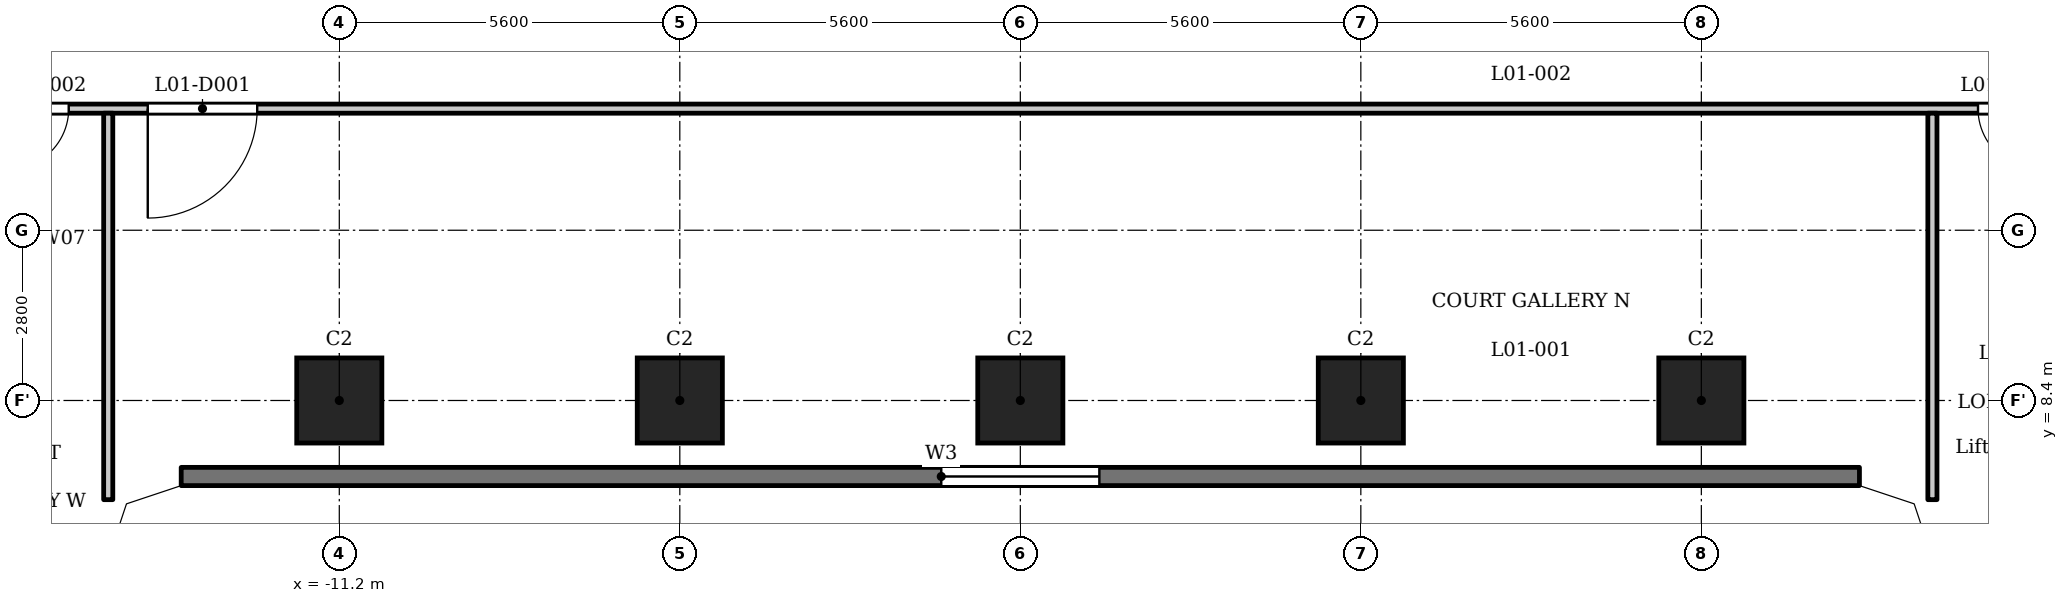
"""IFC4 building model, lengths in metres.
Left out: names, types, materials, properties, quantities, classifications, styles, units other than length and angle.
Written with IfcOpenShell. Run it as: python <this file> out.ifc"""

import sys

from ifc_helpers import new_model, si_unit, direction, frame, frame_2d, origin, origin_2d, place, context, subcontext, project, spatial, polyline, rectangle, outline, extrude, element, fill, save


model = new_model("IFC4")
c1 = context("Model", 3, precision=1e-05, world=origin(), true_north=direction((0.0, 1.0)))
c2 = subcontext(c1, "Body", "Model", "MODEL_VIEW")
j1 = project(units=[si_unit("LENGTHUNIT", "METRE"), si_unit("PLANEANGLEUNIT", "RADIAN")], contexts=[c1])
p1 = place(None, origin())
s1 = spatial("IfcSite", under=j1, at=p1, CompositionType="ELEMENT")
p2 = place(p1, origin())
s2 = spatial("IfcBuilding", under=s1, at=p2, CompositionType="ELEMENT")
p3 = place(p2, frame((0.0, 0.0, 6.5)))
s3 = spatial("IfcBuildingStorey", under=s2, at=p3, CompositionType="ELEMENT", Elevation=6.5)
for number, where, z_axis, x_axis in (
    (1, (-11.2, 8.4, 0.0), (0.0, 0.0, 1.0), (1.0, 0.0, 0.0)),
    (2, (-5.6, 8.4, 0.0), (0.0, 0.0, 1.0), (1.0, 0.0, 0.0)),
    (3, (0.0, 8.4, 0.0), (0.0, 0.0, 1.0), (1.0, 0.0, 0.0)),
    (4, (5.6, 8.4, 0.0), (0.0, 0.0, 1.0), (1.0, 0.0, 0.0)),
    (5, (11.2, 8.4, 0.0), (0.0, 0.0, 1.0), (1.0, 0.0, 0.0)),
):
    element("IfcColumn", number, at=place(p3, frame(where, z_axis=z_axis, x_axis=x_axis)), inside=s3, PredefinedType="COLUMN", context=c2, shape_type="SweptSolid", body=[
        extrude(rectangle(XDim=1.4, YDim=1.4, at=origin_2d()), origin(), (0.0, 0.0, 1.0), 4.8),
    ])
p4 = place(p3, frame((-13.8, 7.15, 0.0), z_axis=(0.0, 0.0, 1.0), x_axis=(1.0, 0.0, 0.0)))
e6 = element("IfcWall", 6, at=p4, inside=s3, PredefinedType="SOLIDWALL", context=c2, shape_type="SweptSolid", body=[
    extrude(rectangle(XDim=27.6, YDim=0.3, at=frame_2d((13.8, 0.0))), origin(), (0.0, 0.0, 1.0), 4.45),
])
p5 = place(p4, frame((12.5, 0.0, 0.9)))
e7 = element("IfcOpeningElement", 7, at=p5, cuts=e6, PredefinedType="OPENING", context=c2, shape_type="SweptSolid", body=[
    extrude(rectangle(XDim=2.6, YDim=1.25, at=frame_2d((1.3, 0.625))), frame((0.0, 0.16, 0.0), z_axis=(0.0, -1.0, 0.0), x_axis=(1.0, 0.0, 0.0)), (0.0, 0.0, 1.0), 0.32),
])
p6 = place(p3, frame((-17.4, 13.2, 0.0), z_axis=(0.0, 0.0, 1.0), x_axis=(1.0, 0.0, 0.0)))
e8 = element("IfcWall", 8, at=p6, inside=s3, PredefinedType="PARTITIONING", context=c2, shape_type="SweptSolid", body=[
    extrude(rectangle(XDim=34.8, YDim=0.15, at=frame_2d((17.4, 0.0))), origin(), (0.0, 0.0, 1.0), 4.45),
])
p7 = place(p6, frame((3.05, 0.0, 0.0)))
e9 = element("IfcOpeningElement", 9, at=p7, cuts=e8, PredefinedType="OPENING", context=c2, shape_type="SweptSolid", body=[
    extrude(rectangle(XDim=1.8, YDim=2.1, at=frame_2d((0.9, 1.05))), frame((0.0, 0.085, 0.0), z_axis=(0.0, -1.0, 0.0), x_axis=(1.0, 0.0, 0.0)), (0.0, 0.0, 1.0), 0.17),
])
p8 = place(p6, frame((0.75, 0.0, 0.0)))
e10 = element("IfcOpeningElement", 10, at=p8, cuts=e8, PredefinedType="OPENING", context=c2, shape_type="SweptSolid", body=[
    extrude(rectangle(XDim=1.0, YDim=2.1, at=frame_2d((0.5, 1.05))), frame((0.0, 0.085, 0.0), z_axis=(0.0, -1.0, 0.0), x_axis=(1.0, 0.0, 0.0)), (0.0, 0.0, 1.0), 0.17),
])
p9 = place(p6, frame((33.15, 0.0, 0.0)))
e11 = element("IfcOpeningElement", 11, at=p9, cuts=e8, PredefinedType="OPENING", context=c2, shape_type="SweptSolid", body=[
    extrude(rectangle(XDim=1.0, YDim=2.1, at=frame_2d((0.5, 1.05))), frame((0.0, 0.085, 0.0), z_axis=(0.0, -1.0, 0.0), x_axis=(1.0, 0.0, 0.0)), (0.0, 0.0, 1.0), 0.17),
])
for number, where, z_axis, x_axis in (
    (12, (-15.0, 6.769, 0.0), (0.0, 0.0, 1.0), (0.0, 1.0, 0.0)),
    (13, (15.0, 6.769, 0.0), (0.0, 0.0, 1.0), (0.0, 1.0, 0.0)),
):
    element("IfcWall", number, at=place(p3, frame(where, z_axis=z_axis, x_axis=x_axis)), inside=s3, PredefinedType="PARTITIONING", context=c2, shape_type="SweptSolid", body=[
        extrude(rectangle(XDim=6.356, YDim=0.15, at=frame_2d((3.178, 0.0))), origin(), (0.0, 0.0, 1.0), 4.45),
    ])
p10 = place(p3, origin())
e14 = element("IfcWall", 14, at=p10, inside=s3, PredefinedType="SOLIDWALL", context=c2, shape_type="SweptSolid", body=[
    extrude(outline(polyline([(-13.849, 7.3), (-14.937, 6.937), (-15.3, 5.849), (-15.3, 5.8), (-15.0, 5.8), (-14.7, 6.7), (-13.8, 7.0), (-13.8, 7.3), (-13.849, 7.3)])), origin(), (0.0, 0.0, 1.0), 4.45),
])
e15 = element("IfcWall", 15, at=p10, inside=s3, PredefinedType="SOLIDWALL", context=c2, shape_type="SweptSolid", body=[
    extrude(outline(polyline([(14.937, 6.937), (13.849, 7.3), (13.8, 7.3), (13.8, 7.0), (14.7, 6.7), (15.0, 5.8), (15.3, 5.8), (15.3, 5.849), (14.937, 6.937)])), origin(), (0.0, 0.0, 1.0), 4.45),
])
p11 = place(p7, origin())
e16 = element("IfcDoor", 16, at=p11, inside=s3, OperationType="SINGLE_SWING_LEFT", PredefinedType="DOOR", context=c2, shape_type="SweptSolid", body=[
    extrude(rectangle(XDim=1.8, YDim=2.1, at=frame_2d((0.9, 1.05))), frame((0.0, 0.025, 0.0), z_axis=(0.0, -1.0, 0.0), x_axis=(1.0, 0.0, 0.0)), (0.0, 0.0, 1.0), 0.05),
])
fill(e9, e16)
p12 = place(p8, origin())
e17 = element("IfcDoor", 17, at=p12, inside=s3, OperationType="SINGLE_SWING_LEFT", PredefinedType="DOOR", context=c2, shape_type="SweptSolid", body=[
    extrude(rectangle(XDim=1.0, YDim=2.1, at=frame_2d((0.5, 1.05))), frame((0.0, 0.025, 0.0), z_axis=(0.0, -1.0, 0.0), x_axis=(1.0, 0.0, 0.0)), (0.0, 0.0, 1.0), 0.05),
])
fill(e10, e17)
p13 = place(p9, origin())
e18 = element("IfcDoor", 18, at=p13, inside=s3, OperationType="SINGLE_SWING_RIGHT", PredefinedType="DOOR", context=c2, shape_type="SweptSolid", body=[
    extrude(rectangle(XDim=1.0, YDim=2.1, at=frame_2d((0.5, 1.05))), frame((0.0, 0.025, 0.0), z_axis=(0.0, -1.0, 0.0), x_axis=(1.0, 0.0, 0.0)), (0.0, 0.0, 1.0), 0.05),
])
fill(e11, e18)
p14 = place(p5, origin())
e19 = element("IfcWindow", 19, at=p14, inside=s3, PartitioningType="SINGLE_PANEL", PredefinedType="WINDOW", context=c2, shape_type="SweptSolid", body=[
    extrude(rectangle(XDim=2.6, YDim=1.25, at=frame_2d((1.3, 0.625))), frame((0.0, 0.03, 0.0), z_axis=(0.0, -1.0, 0.0), x_axis=(1.0, 0.0, 0.0)), (0.0, 0.0, 1.0), 0.06),
])
fill(e7, e19)
save(model, sys.argv[1])
